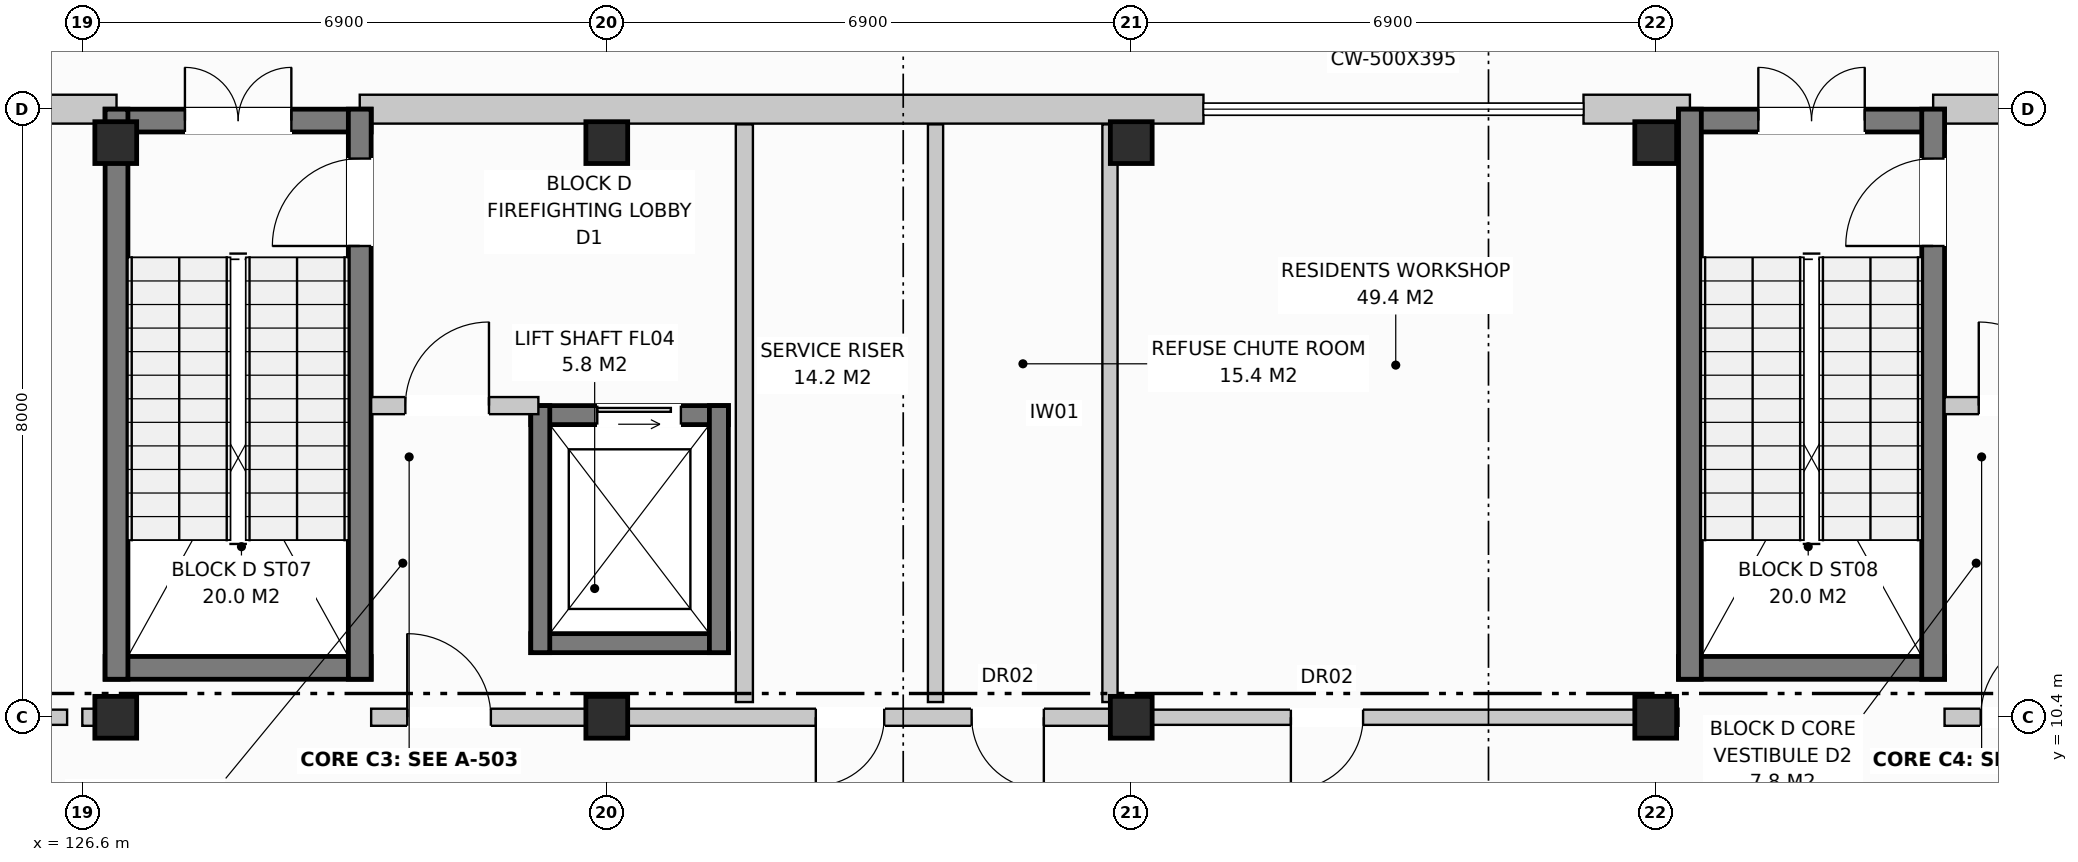
"""IFC4 building model, lengths in metres.
Left out: names, types, materials, properties, quantities, classifications, styles, units other than length and angle.
Written with IfcOpenShell. Run it as: python <this file> out.ifc"""

import sys

from ifc_helpers import new_model, si_unit, direction, frame, frame_2d, origin, origin_with_axes, origin_2d, place, context, subcontext, project, spatial, rectangle, extrude, element, fill, save


model = new_model("IFC4")
c1 = context("Model", 3, precision=1e-05, world=origin(), true_north=direction((0.0, 1.0)))
c2 = subcontext(c1, "Body", "Model", "MODEL_VIEW")
j1 = project(units=[si_unit("LENGTHUNIT", "METRE"), si_unit("PLANEANGLEUNIT", "RADIAN")], contexts=[c1])
p1 = place(None, origin())
s1 = spatial("IfcSite", under=j1, at=p1, CompositionType="ELEMENT")
p2 = place(p1, origin())
s2 = spatial("IfcBuilding", under=s1, at=p2, CompositionType="ELEMENT")
p3 = place(p2, origin())
s3 = spatial("IfcBuildingStorey", under=s2, at=p3, CompositionType="ELEMENT", Elevation=0.0)
for number, where, z_axis, x_axis in (
    (1, (127.04, 10.4, 0.0), (0.0, 0.0, 1.0), (1.0, 0.0, 0.0)),
    (2, (127.04, 17.96, 0.0), (0.0, 0.0, 1.0), (1.0, 0.0, 0.0)),
    (3, (133.5, 10.4, 0.0), (0.0, 0.0, 1.0), (1.0, 0.0, 0.0)),
    (4, (133.5, 17.96, 0.0), (0.0, 0.0, 1.0), (1.0, 0.0, 0.0)),
    (5, (140.4, 10.4, 0.0), (0.0, 0.0, 1.0), (1.0, 0.0, 0.0)),
    (6, (140.4, 17.96, 0.0), (0.0, 0.0, 1.0), (1.0, 0.0, 0.0)),
    (7, (147.3, 10.4, 0.0), (0.0, 0.0, 1.0), (1.0, 0.0, 0.0)),
    (8, (147.3, 17.96, 0.0), (0.0, 0.0, 1.0), (1.0, 0.0, 0.0)),
):
    element("IfcColumn", number, at=place(p3, frame(where, z_axis=z_axis, x_axis=x_axis)), inside=s3, PredefinedType="COLUMN", context=c2, shape_type="SweptSolid", body=[
        extrude(rectangle(XDim=0.55, YDim=0.55, at=origin_2d()), origin(), (0.0, 0.0, 1.0), 4.4),
    ])
p4 = place(p3, frame((125.65, 18.4, 0.0), z_axis=(0.0, 0.0, 1.0), x_axis=(1.0, 0.0, 0.0)))
e9 = element("IfcWall", 9, at=p4, inside=s3, PredefinedType="STANDARD", context=c2, shape_type="SweptSolid", body=[
    extrude(rectangle(XDim=1.4, YDim=0.38, at=frame_2d((0.7, 0.0))), origin(), (0.0, 0.0, 1.0), 4.12),
])
p5 = place(p3, frame((130.25, 18.4, 0.0), z_axis=(0.0, 0.0, 1.0), x_axis=(1.0, 0.0, 0.0)))
e10 = element("IfcWall", 10, at=p5, inside=s3, PredefinedType="STANDARD", context=c2, shape_type="SweptSolid", body=[
    extrude(rectangle(XDim=11.1, YDim=0.38, at=frame_2d((5.55, 0.0))), origin(), (0.0, 0.0, 1.0), 4.12),
])
p6 = place(p3, frame((146.35, 18.4, 0.0), z_axis=(0.0, 0.0, 1.0), x_axis=(1.0, 0.0, 0.0)))
e11 = element("IfcWall", 11, at=p6, inside=s3, PredefinedType="STANDARD", context=c2, shape_type="SweptSolid", body=[
    extrude(rectangle(XDim=1.4, YDim=0.38, at=frame_2d((0.7, 0.0))), origin(), (0.0, 0.0, 1.0), 4.12),
])
p7 = place(p3, frame((150.95, 18.4, 0.0), z_axis=(0.0, 0.0, 1.0), x_axis=(1.0, 0.0, 0.0)))
e12 = element("IfcWall", 12, at=p7, inside=s3, PredefinedType="STANDARD", context=c2, shape_type="SweptSolid", body=[
    extrude(rectangle(XDim=11.1, YDim=0.38, at=frame_2d((5.55, 0.0))), origin(), (0.0, 0.0, 1.0), 4.12),
])
p8 = place(p3, frame((126.9, 18.25, 0.0), z_axis=(0.0, 0.0, 1.0), x_axis=(1.0, 0.0, 0.0)))
e13 = element("IfcWall", 13, at=p8, inside=s3, PredefinedType="SHEAR", context=c2, shape_type="SweptSolid", body=[
    extrude(rectangle(XDim=3.5, YDim=0.3, at=frame_2d((1.75, 0.0))), origin(), (0.0, 0.0, 1.0), 4.12),
])
p9 = place(p8, frame((1.05, 0.0, 0.0)))
e14 = element("IfcOpeningElement", 14, at=p9, cuts=e13, PredefinedType="OPENING", context=c2, shape_type="SweptSolid", body=[
    extrude(rectangle(XDim=1.4, YDim=2.25, at=frame_2d((0.7, 1.125))), frame((0.0, 0.162, 0.0), z_axis=(0.0, -1.0, 0.0), x_axis=(1.0, 0.0, 0.0)), (0.0, 0.0, 1.0), 0.324),
])
p10 = place(p3, frame((126.9, 11.05, 0.0), z_axis=(0.0, 0.0, 1.0), x_axis=(1.0, 0.0, 0.0)))
e15 = element("IfcWall", 15, at=p10, inside=s3, PredefinedType="SHEAR", context=c2, shape_type="SweptSolid", body=[
    extrude(rectangle(XDim=3.5, YDim=0.3, at=frame_2d((1.75, 0.0))), origin(), (0.0, 0.0, 1.0), 4.12),
])
p11 = place(p3, frame((127.05, 10.9, 0.0), z_axis=(0.0, 0.0, 1.0), x_axis=(0.0, 1.0, 0.0)))
e16 = element("IfcWall", 16, at=p11, inside=s3, PredefinedType="SHEAR", context=c2, shape_type="SweptSolid", body=[
    extrude(rectangle(XDim=7.5, YDim=0.3, at=frame_2d((3.75, 0.0))), origin(), (0.0, 0.0, 1.0), 4.12),
])
p12 = place(p3, frame((130.25, 10.9, 0.0), z_axis=(0.0, 0.0, 1.0), x_axis=(0.0, 1.0, 0.0)))
e17 = element("IfcWall", 17, at=p12, inside=s3, PredefinedType="SHEAR", context=c2, shape_type="SweptSolid", body=[
    extrude(rectangle(XDim=7.5, YDim=0.3, at=frame_2d((3.75, 0.0))), origin(), (0.0, 0.0, 1.0), 4.12),
])
p13 = place(p12, frame((5.7, 0.0, 0.0)))
e18 = element("IfcOpeningElement", 18, at=p13, cuts=e17, PredefinedType="OPENING", context=c2, shape_type="SweptSolid", body=[
    extrude(rectangle(XDim=1.15, YDim=2.15, at=frame_2d((0.575, 1.075))), frame((0.0, 0.162, 0.0), z_axis=(0.0, -1.0, 0.0), x_axis=(1.0, 0.0, 0.0)), (0.0, 0.0, 1.0), 0.324),
])
p14 = place(p3, frame((132.5, 14.375, 0.0), z_axis=(0.0, 0.0, 1.0), x_axis=(1.0, 0.0, 0.0)))
e19 = element("IfcWall", 19, at=p14, inside=s3, PredefinedType="SHEAR", context=c2, shape_type="SweptSolid", body=[
    extrude(rectangle(XDim=2.6, YDim=0.25, at=frame_2d((1.3, 0.0))), origin(), (0.0, 0.0, 1.0), 4.12),
])
p15 = place(p14, frame((0.875, 0.0, 0.0)))
e20 = element("IfcOpeningElement", 20, at=p15, cuts=e19, PredefinedType="OPENING", context=c2, shape_type="SweptSolid", body=[
    extrude(rectangle(XDim=1.1, YDim=2.1, at=frame_2d((0.55, 1.05))), frame((0.0, 0.137, 0.0), z_axis=(0.0, -1.0, 0.0), x_axis=(1.0, 0.0, 0.0)), (0.0, 0.0, 1.0), 0.274),
])
p16 = place(p3, frame((132.5, 11.375, 0.0), z_axis=(0.0, 0.0, 1.0), x_axis=(1.0, 0.0, 0.0)))
e21 = element("IfcWall", 21, at=p16, inside=s3, PredefinedType="SHEAR", context=c2, shape_type="SweptSolid", body=[
    extrude(rectangle(XDim=2.6, YDim=0.25, at=frame_2d((1.3, 0.0))), origin(), (0.0, 0.0, 1.0), 4.12),
])
for number, where, z_axis, x_axis in (
    (22, (132.625, 11.25, 0.0), (0.0, 0.0, 1.0), (0.0, 1.0, 0.0)),
    (23, (134.975, 11.25, 0.0), (0.0, 0.0, 1.0), (0.0, 1.0, 0.0)),
):
    element("IfcWall", number, at=place(p3, frame(where, z_axis=z_axis, x_axis=x_axis)), inside=s3, PredefinedType="SHEAR", context=c2, shape_type="SweptSolid", body=[
        extrude(rectangle(XDim=3.25, YDim=0.25, at=frame_2d((1.625, 0.0))), origin(), (0.0, 0.0, 1.0), 4.12),
    ])
p17 = place(p3, frame((135.31, 10.6, 0.0), z_axis=(0.0, 0.0, 1.0), x_axis=(0.0, 1.0, 0.0)))
e24 = element("IfcWall", 24, at=p17, inside=s3, PredefinedType="PARTITIONING", context=c2, shape_type="SweptSolid", body=[
    extrude(rectangle(XDim=7.6, YDim=0.225, at=frame_2d((3.8, 0.0))), origin(), (0.0, 0.0, 1.0), 4.12),
])
p18 = place(p3, frame((130.4, 14.5, 0.0), z_axis=(0.0, 0.0, 1.0), x_axis=(1.0, 0.0, 0.0)))
e25 = element("IfcWall", 25, at=p18, inside=s3, PredefinedType="PARTITIONING", context=c2, shape_type="SweptSolid", body=[
    extrude(rectangle(XDim=2.2, YDim=0.225, at=frame_2d((1.1, 0.0))), origin(), (0.0, 0.0, 1.0), 4.12),
])
p19 = place(p18, frame((0.45, 0.0, 0.0)))
e26 = element("IfcOpeningElement", 26, at=p19, cuts=e25, PredefinedType="OPENING", context=c2, shape_type="SweptSolid", body=[
    extrude(rectangle(XDim=1.1, YDim=2.15, at=frame_2d((0.55, 1.075))), frame((0.0, 0.125, 0.0), z_axis=(0.0, -1.0, 0.0), x_axis=(1.0, 0.0, 0.0)), (0.0, 0.0, 1.0), 0.249),
])
p20 = place(p3, frame((126.6, 10.4, 0.0), z_axis=(0.0, 0.0, 1.0), x_axis=(1.0, 0.0, 0.0)))
e27 = element("IfcWall", 27, at=p20, inside=s3, PredefinedType="PARTITIONING", context=c2, shape_type="SweptSolid", body=[
    extrude(rectangle(XDim=0.3, YDim=0.225, at=frame_2d((0.15, 0.0))), origin(), (0.0, 0.0, 1.0), 4.12),
])
for number, where, z_axis, x_axis in (
    (28, (137.825, 10.6, 0.0), (0.0, 0.0, 1.0), (0.0, 1.0, 0.0)),
    (29, (140.12, 10.6, 0.0), (0.0, 0.0, 1.0), (0.0, 1.0, 0.0)),
):
    element("IfcWall", number, at=place(p3, frame(where, z_axis=z_axis, x_axis=x_axis)), inside=s3, PredefinedType="PARTITIONING", context=c2, shape_type="SweptSolid", body=[
        extrude(rectangle(XDim=7.6, YDim=0.2, at=frame_2d((3.8, 0.0))), origin(), (0.0, 0.0, 1.0), 4.12),
    ])
p21 = place(p3, frame((130.4, 10.4, 0.0), z_axis=(0.0, 0.0, 1.0), x_axis=(1.0, 0.0, 0.0)))
e30 = element("IfcWall", 30, at=p21, inside=s3, PredefinedType="PARTITIONING", context=c2, shape_type="SweptSolid", body=[
    extrude(rectangle(XDim=10.0, YDim=0.225, at=frame_2d((5.0, 0.0))), origin(), (0.0, 0.0, 1.0), 3.56),
])
p22 = place(p21, frame((0.475, 0.0, 0.0)))
e31 = element("IfcOpeningElement", 31, at=p22, cuts=e30, PredefinedType="OPENING", context=c2, shape_type="SweptSolid", body=[
    extrude(rectangle(XDim=1.1, YDim=2.15, at=frame_2d((0.55, 1.075))), frame((0.0, 0.125, 0.0), z_axis=(0.0, -1.0, 0.0), x_axis=(1.0, 0.0, 0.0)), (0.0, 0.0, 1.0), 0.249),
])
p23 = place(p21, frame((5.85, 0.0, 0.0)))
e32 = element("IfcOpeningElement", 32, at=p23, cuts=e30, PredefinedType="OPENING", context=c2, shape_type="SweptSolid", body=[
    extrude(rectangle(XDim=0.9, YDim=2.1, at=frame_2d((0.45, 1.05))), frame((0.0, 0.125, 0.0), z_axis=(0.0, -1.0, 0.0), x_axis=(1.0, 0.0, 0.0)), (0.0, 0.0, 1.0), 0.249),
])
p24 = place(p21, frame((7.9, 0.0, 0.0)))
e33 = element("IfcOpeningElement", 33, at=p24, cuts=e30, PredefinedType="OPENING", context=c2, shape_type="SweptSolid", body=[
    extrude(rectangle(XDim=0.95, YDim=2.15, at=frame_2d((0.475, 1.075))), frame((0.0, 0.125, 0.0), z_axis=(0.0, -1.0, 0.0), x_axis=(1.0, 0.0, 0.0)), (0.0, 0.0, 1.0), 0.249),
])
p25 = place(p3, frame((147.6, 18.25, 0.0), z_axis=(0.0, 0.0, 1.0), x_axis=(1.0, 0.0, 0.0)))
e34 = element("IfcWall", 34, at=p25, inside=s3, PredefinedType="SHEAR", context=c2, shape_type="SweptSolid", body=[
    extrude(rectangle(XDim=3.5, YDim=0.3, at=frame_2d((1.75, 0.0))), origin(), (0.0, 0.0, 1.0), 4.12),
])
p26 = place(p25, frame((1.05, 0.0, 0.0)))
e35 = element("IfcOpeningElement", 35, at=p26, cuts=e34, PredefinedType="OPENING", context=c2, shape_type="SweptSolid", body=[
    extrude(rectangle(XDim=1.4, YDim=2.25, at=frame_2d((0.7, 1.125))), frame((0.0, 0.162, 0.0), z_axis=(0.0, -1.0, 0.0), x_axis=(1.0, 0.0, 0.0)), (0.0, 0.0, 1.0), 0.324),
])
p27 = place(p3, frame((147.6, 11.05, 0.0), z_axis=(0.0, 0.0, 1.0), x_axis=(1.0, 0.0, 0.0)))
e36 = element("IfcWall", 36, at=p27, inside=s3, PredefinedType="SHEAR", context=c2, shape_type="SweptSolid", body=[
    extrude(rectangle(XDim=3.5, YDim=0.3, at=frame_2d((1.75, 0.0))), origin(), (0.0, 0.0, 1.0), 4.12),
])
p28 = place(p3, frame((147.75, 10.9, 0.0), z_axis=(0.0, 0.0, 1.0), x_axis=(0.0, 1.0, 0.0)))
e37 = element("IfcWall", 37, at=p28, inside=s3, PredefinedType="SHEAR", context=c2, shape_type="SweptSolid", body=[
    extrude(rectangle(XDim=7.5, YDim=0.3, at=frame_2d((3.75, 0.0))), origin(), (0.0, 0.0, 1.0), 4.12),
])
p29 = place(p3, frame((150.95, 10.9, 0.0), z_axis=(0.0, 0.0, 1.0), x_axis=(0.0, 1.0, 0.0)))
e38 = element("IfcWall", 38, at=p29, inside=s3, PredefinedType="SHEAR", context=c2, shape_type="SweptSolid", body=[
    extrude(rectangle(XDim=7.5, YDim=0.3, at=frame_2d((3.75, 0.0))), origin(), (0.0, 0.0, 1.0), 4.12),
])
p30 = place(p29, frame((5.7, 0.0, 0.0)))
e39 = element("IfcOpeningElement", 39, at=p30, cuts=e38, PredefinedType="OPENING", context=c2, shape_type="SweptSolid", body=[
    extrude(rectangle(XDim=1.15, YDim=2.15, at=frame_2d((0.575, 1.075))), frame((0.0, 0.162, 0.0), z_axis=(0.0, -1.0, 0.0), x_axis=(1.0, 0.0, 0.0)), (0.0, 0.0, 1.0), 0.324),
])
p31 = place(p3, frame((151.1, 14.5, 0.0), z_axis=(0.0, 0.0, 1.0), x_axis=(1.0, 0.0, 0.0)))
e40 = element("IfcWall", 40, at=p31, inside=s3, PredefinedType="PARTITIONING", context=c2, shape_type="SweptSolid", body=[
    extrude(rectangle(XDim=2.2, YDim=0.225, at=frame_2d((1.1, 0.0))), origin(), (0.0, 0.0, 1.0), 4.12),
])
p32 = place(p31, frame((0.45, 0.0, 0.0)))
e41 = element("IfcOpeningElement", 41, at=p32, cuts=e40, PredefinedType="OPENING", context=c2, shape_type="SweptSolid", body=[
    extrude(rectangle(XDim=1.1, YDim=2.15, at=frame_2d((0.55, 1.075))), frame((0.0, 0.125, 0.0), z_axis=(0.0, -1.0, 0.0), x_axis=(1.0, 0.0, 0.0)), (0.0, 0.0, 1.0), 0.249),
])
p33 = place(p3, frame((147.3, 10.4, 0.0), z_axis=(0.0, 0.0, 1.0), x_axis=(1.0, 0.0, 0.0)))
e42 = element("IfcWall", 42, at=p33, inside=s3, PredefinedType="PARTITIONING", context=c2, shape_type="SweptSolid", body=[
    extrude(rectangle(XDim=0.3, YDim=0.225, at=frame_2d((0.15, 0.0))), origin(), (0.0, 0.0, 1.0), 4.12),
])
p34 = place(p3, frame((151.1, 10.4, 0.0), z_axis=(0.0, 0.0, 1.0), x_axis=(1.0, 0.0, 0.0)))
e43 = element("IfcWall", 43, at=p34, inside=s3, PredefinedType="PARTITIONING", context=c2, shape_type="SweptSolid", body=[
    extrude(rectangle(XDim=10.0, YDim=0.225, at=frame_2d((5.0, 0.0))), origin(), (0.0, 0.0, 1.0), 3.56),
])
p35 = place(p34, frame((0.475, 0.0, 0.0)))
e44 = element("IfcOpeningElement", 44, at=p35, cuts=e43, PredefinedType="OPENING", context=c2, shape_type="SweptSolid", body=[
    extrude(rectangle(XDim=1.1, YDim=2.15, at=frame_2d((0.55, 1.075))), frame((0.0, 0.125, 0.0), z_axis=(0.0, -1.0, 0.0), x_axis=(1.0, 0.0, 0.0)), (0.0, 0.0, 1.0), 0.249),
])
p36 = place(p34, frame((5.85, 0.0, 0.0)))
e45 = element("IfcOpeningElement", 45, at=p36, cuts=e43, PredefinedType="OPENING", context=c2, shape_type="SweptSolid", body=[
    extrude(rectangle(XDim=0.9, YDim=2.1, at=frame_2d((0.45, 1.05))), frame((0.0, 0.125, 0.0), z_axis=(0.0, -1.0, 0.0), x_axis=(1.0, 0.0, 0.0)), (0.0, 0.0, 1.0), 0.249),
])
p37 = place(p34, frame((7.9, 0.0, 0.0)))
e46 = element("IfcOpeningElement", 46, at=p37, cuts=e43, PredefinedType="OPENING", context=c2, shape_type="SweptSolid", body=[
    extrude(rectangle(XDim=0.95, YDim=2.15, at=frame_2d((0.475, 1.075))), frame((0.0, 0.125, 0.0), z_axis=(0.0, -1.0, 0.0), x_axis=(1.0, 0.0, 0.0)), (0.0, 0.0, 1.0), 0.249),
])
p38 = place(p3, frame((113.05, 10.4, 0.0), z_axis=(0.0, 0.0, 1.0), x_axis=(1.0, 0.0, 0.0)))
e47 = element("IfcWall", 47, at=p38, inside=s3, PredefinedType="PARTITIONING", context=c2, shape_type="SweptSolid", body=[
    extrude(rectangle(XDim=13.35, YDim=0.2, at=frame_2d((6.675, 0.0))), origin(), (0.0, 0.0, 1.0), 3.56),
])
p39 = place(p38, frame((1.9, 0.0, 0.0)))
e48 = element("IfcOpeningElement", 48, at=p39, cuts=e47, PredefinedType="OPENING", context=c2, shape_type="SweptSolid", body=[
    extrude(rectangle(XDim=0.95, YDim=2.15, at=frame_2d((0.475, 1.075))), frame((0.0, 0.112, 0.0), z_axis=(0.0, -1.0, 0.0), x_axis=(1.0, 0.0, 0.0)), (0.0, 0.0, 1.0), 0.224),
])
p40 = place(p3, frame((140.6, 10.4, 0.0), z_axis=(0.0, 0.0, 1.0), x_axis=(1.0, 0.0, 0.0)))
e49 = element("IfcWall", 49, at=p40, inside=s3, PredefinedType="PARTITIONING", context=c2, shape_type="SweptSolid", body=[
    extrude(rectangle(XDim=6.5, YDim=0.2, at=frame_2d((3.25, 0.0))), origin(), (0.0, 0.0, 1.0), 3.56),
])
p41 = place(p40, frame((1.9, 0.0, 0.0)))
e50 = element("IfcOpeningElement", 50, at=p41, cuts=e49, PredefinedType="OPENING", context=c2, shape_type="SweptSolid", body=[
    extrude(rectangle(XDim=0.95, YDim=2.15, at=frame_2d((0.475, 1.075))), frame((0.0, 0.112, 0.0), z_axis=(0.0, -1.0, 0.0), x_axis=(1.0, 0.0, 0.0)), (0.0, 0.0, 1.0), 0.224),
])
p42 = place(p9, origin_with_axes())
e51 = element("IfcDoor", 51, at=p42, inside=s3, OperationType="DOUBLE_DOOR_SINGLE_SWING", PredefinedType="DOOR", context=c2, shape_type="SweptSolid", body=[
    extrude(rectangle(XDim=1.4, YDim=2.25, at=frame_2d((0.7, 1.125))), frame((0.0, 0.025, 0.0), z_axis=(0.0, -1.0, 0.0), x_axis=(1.0, 0.0, 0.0)), (0.0, 0.0, 1.0), 0.05),
])
fill(e14, e51)
p43 = place(p13, origin_with_axes())
e52 = element("IfcDoor", 52, at=p43, inside=s3, OperationType="SINGLE_SWING_LEFT", PredefinedType="DOOR", context=c2, shape_type="SweptSolid", body=[
    extrude(rectangle(XDim=1.15, YDim=2.15, at=frame_2d((0.575, 1.075))), frame((0.0, 0.025, 0.0), z_axis=(0.0, -1.0, 0.0), x_axis=(1.0, 0.0, 0.0)), (0.0, 0.0, 1.0), 0.05),
])
fill(e18, e52)
p44 = place(p15, origin_with_axes())
e53 = element("IfcDoor", 53, at=p44, inside=s3, OperationType="SLIDING_TO_LEFT", PredefinedType="DOOR", context=c2, shape_type="SweptSolid", body=[
    extrude(rectangle(XDim=1.1, YDim=2.1, at=frame_2d((0.55, 1.05))), frame((0.0, 0.025, 0.0), z_axis=(0.0, -1.0, 0.0), x_axis=(1.0, 0.0, 0.0)), (0.0, 0.0, 1.0), 0.05),
])
fill(e20, e53)
p45 = place(p19, origin_with_axes())
e54 = element("IfcDoor", 54, at=p45, inside=s3, OperationType="SINGLE_SWING_RIGHT", PredefinedType="DOOR", context=c2, shape_type="SweptSolid", body=[
    extrude(rectangle(XDim=1.1, YDim=2.15, at=frame_2d((0.55, 1.075))), frame((0.0, 0.025, 0.0), z_axis=(0.0, -1.0, 0.0), x_axis=(1.0, 0.0, 0.0)), (0.0, 0.0, 1.0), 0.05),
])
fill(e26, e54)
p46 = place(p22, origin_with_axes())
e55 = element("IfcDoor", 55, at=p46, inside=s3, OperationType="SINGLE_SWING_LEFT", PredefinedType="DOOR", context=c2, shape_type="SweptSolid", body=[
    extrude(rectangle(XDim=1.1, YDim=2.15, at=frame_2d((0.55, 1.075))), frame((0.0, 0.025, 0.0), z_axis=(0.0, -1.0, 0.0), x_axis=(1.0, 0.0, 0.0)), (0.0, 0.0, 1.0), 0.05),
])
fill(e31, e55)
p47 = place(p23, frame((0.9, 0.0, 0.0), z_axis=(0.0, 0.0, 1.0), x_axis=(-1.0, 0.0, 0.0)))
e56 = element("IfcDoor", 56, at=p47, inside=s3, OperationType="SINGLE_SWING_LEFT", PredefinedType="DOOR", context=c2, shape_type="SweptSolid", body=[
    extrude(rectangle(XDim=0.9, YDim=2.1, at=frame_2d((0.45, 1.05))), frame((0.0, 0.025, 0.0), z_axis=(0.0, -1.0, 0.0), x_axis=(1.0, 0.0, 0.0)), (0.0, 0.0, 1.0), 0.05),
])
fill(e32, e56)
p48 = place(p24, frame((0.95, 0.0, 0.0), z_axis=(0.0, 0.0, 1.0), x_axis=(-1.0, 0.0, 0.0)))
e57 = element("IfcDoor", 57, at=p48, inside=s3, OperationType="SINGLE_SWING_RIGHT", PredefinedType="DOOR", context=c2, shape_type="SweptSolid", body=[
    extrude(rectangle(XDim=0.95, YDim=2.15, at=frame_2d((0.475, 1.075))), frame((0.0, 0.025, 0.0), z_axis=(0.0, -1.0, 0.0), x_axis=(1.0, 0.0, 0.0)), (0.0, 0.0, 1.0), 0.05),
])
fill(e33, e57)
p49 = place(p26, origin_with_axes())
e58 = element("IfcDoor", 58, at=p49, inside=s3, OperationType="DOUBLE_DOOR_SINGLE_SWING", PredefinedType="DOOR", context=c2, shape_type="SweptSolid", body=[
    extrude(rectangle(XDim=1.4, YDim=2.25, at=frame_2d((0.7, 1.125))), frame((0.0, 0.025, 0.0), z_axis=(0.0, -1.0, 0.0), x_axis=(1.0, 0.0, 0.0)), (0.0, 0.0, 1.0), 0.05),
])
fill(e35, e58)
p50 = place(p30, origin_with_axes())
e59 = element("IfcDoor", 59, at=p50, inside=s3, OperationType="SINGLE_SWING_LEFT", PredefinedType="DOOR", context=c2, shape_type="SweptSolid", body=[
    extrude(rectangle(XDim=1.15, YDim=2.15, at=frame_2d((0.575, 1.075))), frame((0.0, 0.025, 0.0), z_axis=(0.0, -1.0, 0.0), x_axis=(1.0, 0.0, 0.0)), (0.0, 0.0, 1.0), 0.05),
])
fill(e39, e59)
p51 = place(p32, origin_with_axes())
e60 = element("IfcDoor", 60, at=p51, inside=s3, OperationType="SINGLE_SWING_LEFT", PredefinedType="DOOR", context=c2, shape_type="SweptSolid", body=[
    extrude(rectangle(XDim=1.1, YDim=2.15, at=frame_2d((0.55, 1.075))), frame((0.0, 0.025, 0.0), z_axis=(0.0, -1.0, 0.0), x_axis=(1.0, 0.0, 0.0)), (0.0, 0.0, 1.0), 0.05),
])
fill(e41, e60)
p52 = place(p35, origin_with_axes())
e61 = element("IfcDoor", 61, at=p52, inside=s3, OperationType="SINGLE_SWING_RIGHT", PredefinedType="DOOR", context=c2, shape_type="SweptSolid", body=[
    extrude(rectangle(XDim=1.1, YDim=2.15, at=frame_2d((0.55, 1.075))), frame((0.0, 0.025, 0.0), z_axis=(0.0, -1.0, 0.0), x_axis=(1.0, 0.0, 0.0)), (0.0, 0.0, 1.0), 0.05),
])
fill(e44, e61)
p53 = place(p41, frame((0.95, 0.0, 0.0), z_axis=(0.0, 0.0, 1.0), x_axis=(-1.0, 0.0, 0.0)))
e62 = element("IfcDoor", 62, at=p53, inside=s3, OperationType="SINGLE_SWING_LEFT", PredefinedType="DOOR", context=c2, shape_type="SweptSolid", body=[
    extrude(rectangle(XDim=0.95, YDim=2.15, at=frame_2d((0.475, 1.075))), frame((0.0, 0.025, 0.0), z_axis=(0.0, -1.0, 0.0), x_axis=(1.0, 0.0, 0.0)), (0.0, 0.0, 1.0), 0.05),
])
fill(e50, e62)
save(model, sys.argv[1])
